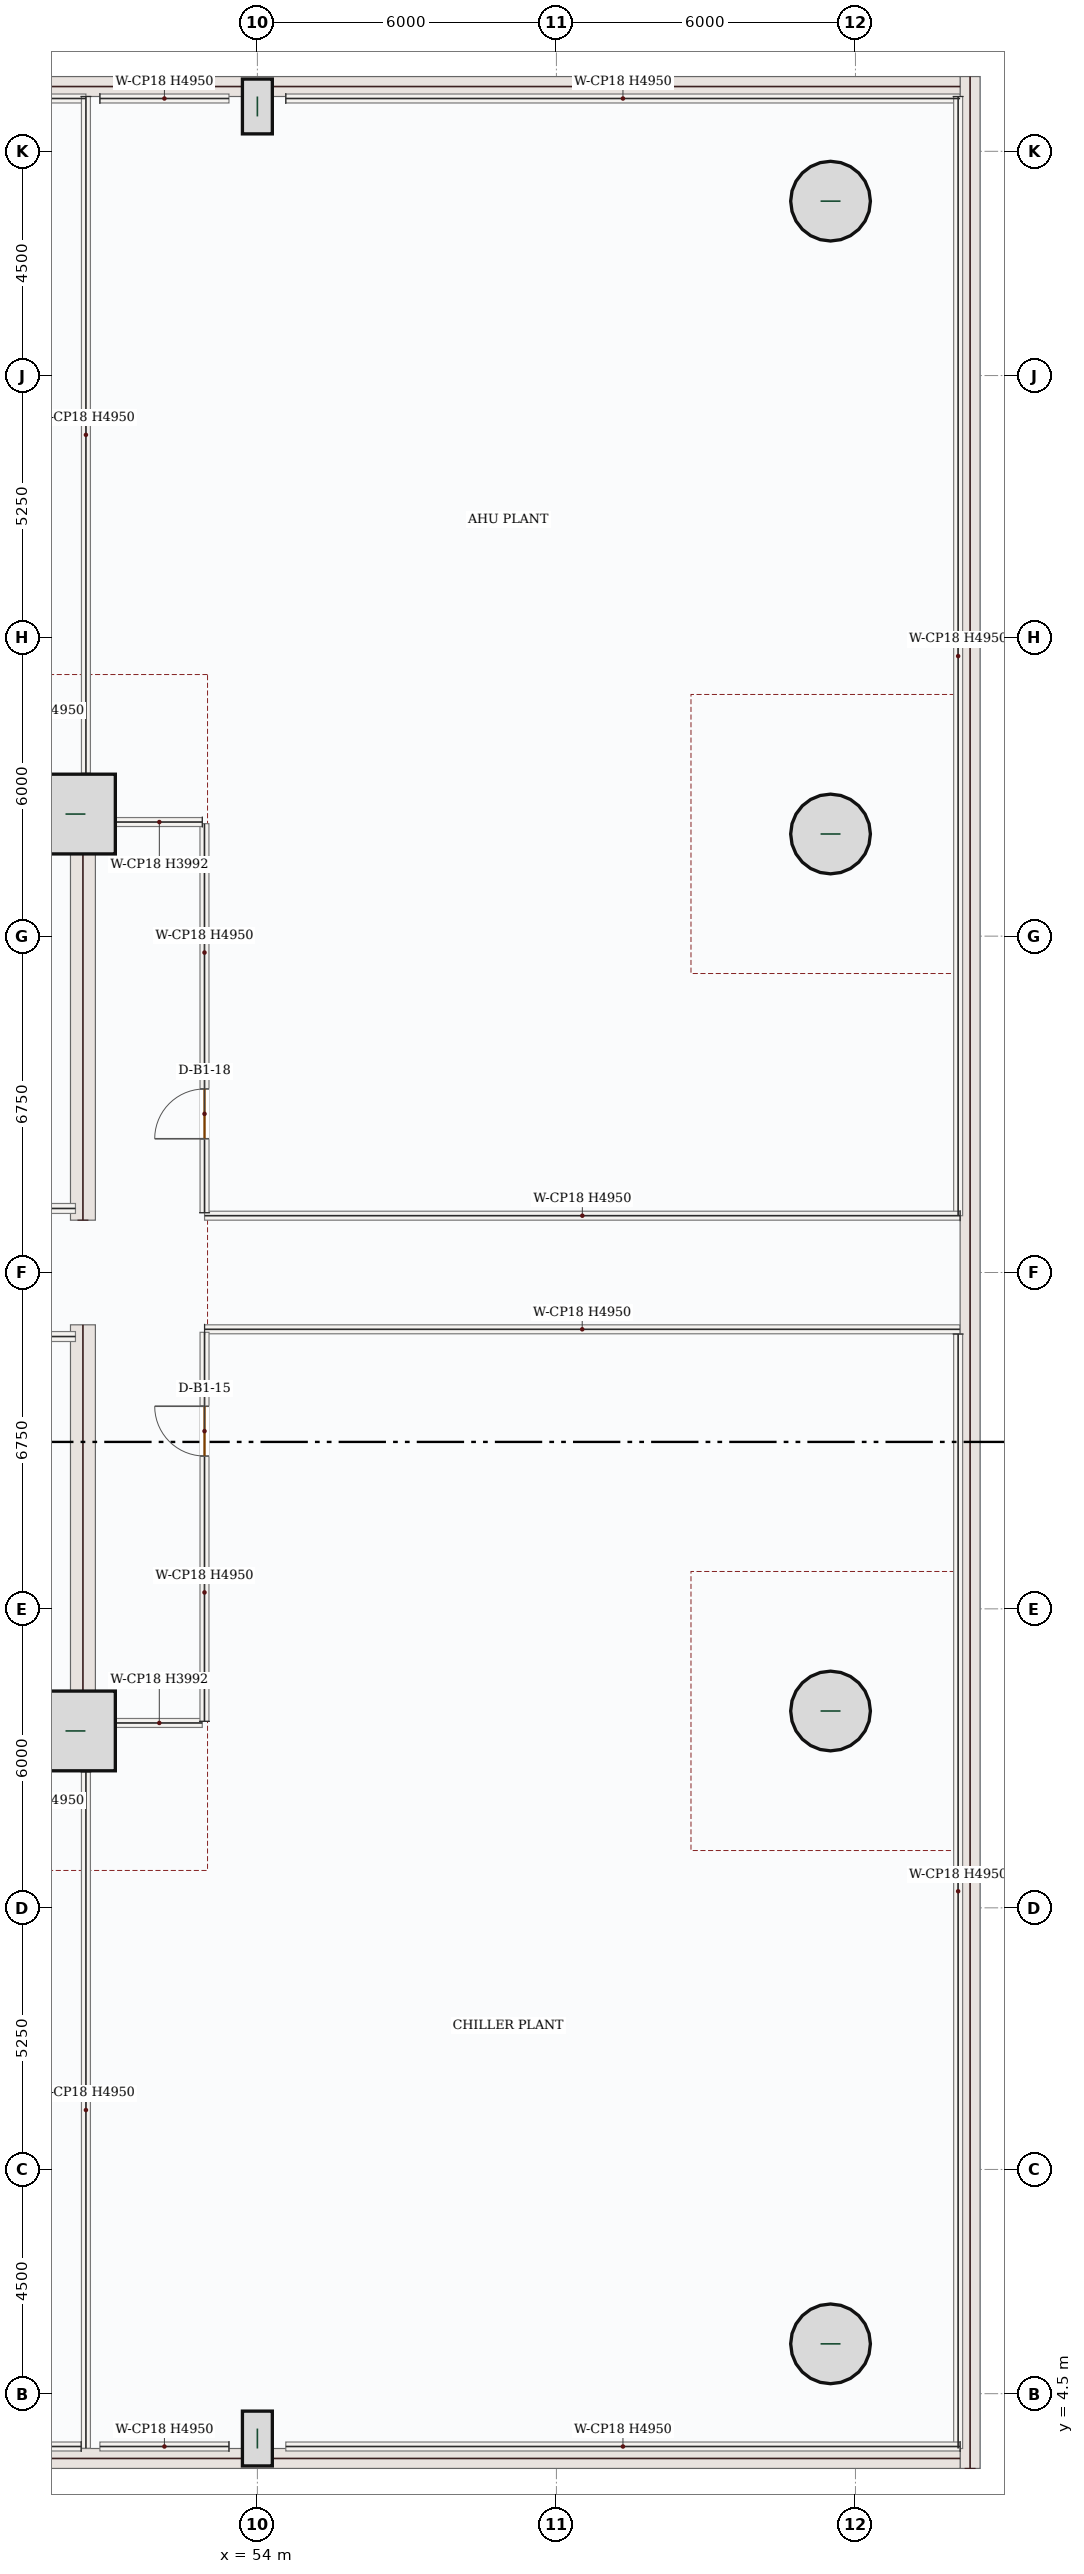
"""IFC4 building model, lengths in metres.
Left out: names, types, materials, properties, quantities, classifications, styles, units other than length and angle.
Written with IfcOpenShell. Run it as: python <this file> out.ifc"""

import sys

from ifc_helpers import new_model, si_unit, direction, frame, frame_2d, origin, origin_2d, place, context, subcontext, project, spatial, rectangle, hollow_circle, extrude, source, transform, mapped, element, fill, save


model = new_model("IFC4")
c1 = context("Model", 3, precision=1e-05, world=origin(), true_north=direction((0.0, 1.0)))
c2 = subcontext(c1, "Body", "Model", "MODEL_VIEW")
j1 = project(units=[si_unit("LENGTHUNIT", "METRE"), si_unit("PLANEANGLEUNIT", "RADIAN")], contexts=[c1])
p1 = place(None, origin())
s1 = spatial("IfcSite", under=j1, at=p1, CompositionType="ELEMENT")
p2 = place(p1, origin())
s2 = spatial("IfcBuilding", under=s1, at=p2, CompositionType="ELEMENT")
p3 = place(p2, frame((0.0, 0.0, -5.4)))
s3 = spatial("IfcBuildingStorey", under=s2, at=p3, CompositionType="ELEMENT", Elevation=-5.4)
m1 = source(origin(), c2, "Body", "SweptSolid", [
    extrude(rectangle(XDim=48.0, YDim=0.4, at=frame_2d((24.0, 0.0))), origin(), (0.0, 0.0, 1.0), 5.05),
])
p4 = place(p3, frame((68.3, 3.0, 0.0), z_axis=(0.0, 0.0, 1.0), x_axis=(0.0, 1.0, 0.0)))
e1 = element("IfcWall", 1, at=p4, inside=s3, PredefinedType="SHEAR", context=c2, shape_type="MappedRepresentation", body=[
    mapped(m1, transform((0.0, 0.0, 0.0), x_axis=(1.0, 0.0, 0.0), y_axis=(0.0, 1.0, 0.0), z_axis=(0.0, 0.0, 1.0), scale=1.0)),
])
m2 = source(origin(), c2, "Body", "SweptSolid", [
    extrude(rectangle(XDim=64.2, YDim=0.4, at=frame_2d((32.1, 0.0))), origin(), (0.0, 0.0, 1.0), 5.05),
])
for number, where, z_axis, x_axis in (
    (2, (3.9, 3.2, 0.0), (0.0, 0.0, 1.0), (1.0, 0.0, 0.0)),
    (3, (3.9, 50.8, 0.0), (0.0, 0.0, 1.0), (1.0, 0.0, 0.0)),
):
    element("IfcWall", number, at=place(p3, frame(where, z_axis=z_axis, x_axis=x_axis)), inside=s3, PredefinedType="SHEAR", context=c2, shape_type="MappedRepresentation", body=[
        mapped(m2, transform((0.0, 0.0, 0.0), x_axis=(1.0, 0.0, 0.0), y_axis=(0.0, 1.0, 0.0), z_axis=(0.0, 0.0, 1.0), scale=1.0)),
    ])
m3 = source(origin(), c2, "Body", "SweptSolid", [
    extrude(rectangle(XDim=8.55, YDim=0.5, at=frame_2d((4.275, 0.0))), origin(), (0.0, 0.0, 1.0), 4.95),
])
for number, where, z_axis, x_axis in (
    (4, (50.5, 17.4, 0.0), (0.0, 0.0, 1.0), (0.0, 1.0, 0.0)),
    (5, (50.5, 28.05, 0.0), (0.0, 0.0, 1.0), (0.0, 1.0, 0.0)),
):
    element("IfcWall", number, at=place(p3, frame(where, z_axis=z_axis, x_axis=x_axis)), inside=s3, PredefinedType="SHEAR", context=c2, shape_type="MappedRepresentation", body=[
        mapped(m3, transform((0.0, 0.0, 0.0), x_axis=(1.0, 0.0, 0.0), y_axis=(0.0, 1.0, 0.0), z_axis=(0.0, 0.0, 1.0), scale=1.0)),
    ])
m4 = source(origin(), c2, "Body", "SweptSolid", [
    extrude(rectangle(XDim=7.0, YDim=0.5, at=frame_2d((3.5, 0.0))), origin(), (0.0, 0.0, 1.0), 4.95),
])
for number, where, z_axis, x_axis in (
    (6, (43.25, 17.65, 0.0), (0.0, 0.0, 1.0), (1.0, 0.0, 0.0)),
    (7, (43.25, 36.35, 0.0), (0.0, 0.0, 1.0), (1.0, 0.0, 0.0)),
):
    element("IfcWall", number, at=place(p3, frame(where, z_axis=z_axis, x_axis=x_axis)), inside=s3, PredefinedType="SHEAR", context=c2, shape_type="MappedRepresentation", body=[
        mapped(m4, transform((0.0, 0.0, 0.0), x_axis=(1.0, 0.0, 0.0), y_axis=(0.0, 1.0, 0.0), z_axis=(0.0, 0.0, 1.0), scale=1.0)),
    ])
m5 = source(origin(), c2, "Body", "SweptSolid", [
    extrude(rectangle(XDim=1.6, YDim=1.6, at=origin_2d()), origin(), (0.0, 0.0, 1.0), 5.4),
])
for number, where, z_axis, x_axis in (
    (8, (50.35, 17.8, 0.0), (0.0, 0.0, 1.0), (1.0, 0.0, 0.0)),
    (9, (50.35, 36.2, 0.0), (0.0, 0.0, 1.0), (1.0, 0.0, 0.0)),
):
    element("IfcColumn", number, at=place(p3, frame(where, z_axis=z_axis, x_axis=x_axis)), inside=s3, PredefinedType="COLUMN", context=c2, shape_type="MappedRepresentation", body=[
        mapped(m5, transform((0.0, 0.0, 0.0), x_axis=(1.0, 0.0, 0.0), y_axis=(0.0, 1.0, 0.0), z_axis=(0.0, 0.0, 1.0), scale=1.0)),
    ])
m6 = source(origin(), c2, "Body", "SweptSolid", [
    extrude(hollow_circle(Radius=0.8, WallThickness=0.06, at=origin_2d()), origin(), (0.0, 0.0, 1.0), 5.4),
])
for number, where, z_axis, x_axis in (
    (10, (65.5, 5.5, 0.0), (0.0, 0.0, 1.0), (1.0, 0.0, 0.0)),
    (11, (65.5, 18.2, 0.0), (0.0, 0.0, 1.0), (1.0, 0.0, 0.0)),
    (12, (65.5, 35.8, 0.0), (0.0, 0.0, 1.0), (1.0, 0.0, 0.0)),
    (13, (65.5, 48.5, 0.0), (0.0, 0.0, 1.0), (1.0, 0.0, 0.0)),
):
    element("IfcColumn", number, at=place(p3, frame(where, z_axis=z_axis, x_axis=x_axis)), inside=s3, PredefinedType="COLUMN", context=c2, shape_type="MappedRepresentation", body=[
        mapped(m6, transform((0.0, 0.0, 0.0), x_axis=(1.0, 0.0, 0.0), y_axis=(0.0, 1.0, 0.0), z_axis=(0.0, 0.0, 1.0), scale=1.0)),
    ])
m7 = source(origin(), c2, "Body", "SweptSolid", [
    extrude(rectangle(XDim=0.6, YDim=1.1, at=origin_2d()), origin(), (0.0, 0.0, 1.0), 5.4),
])
for number, where, z_axis, x_axis in (
    (14, (54.0, 3.6, 0.0), (0.0, 0.0, 1.0), (1.0, 0.0, 0.0)),
    (15, (54.0, 50.4, 0.0), (0.0, 0.0, 1.0), (1.0, 0.0, 0.0)),
):
    element("IfcColumn", number, at=place(p3, frame(where, z_axis=z_axis, x_axis=x_axis)), inside=s3, PredefinedType="PILASTER", context=c2, shape_type="MappedRepresentation", body=[
        mapped(m7, transform((0.0, 0.0, 0.0), x_axis=(1.0, 0.0, 0.0), y_axis=(0.0, 1.0, 0.0), z_axis=(0.0, 0.0, 1.0), scale=1.0)),
    ])
m8 = source(origin(), c2, "Body", "SweptSolid", [
    extrude(rectangle(XDim=4.25, YDim=0.2, at=frame_2d((2.125, 0.0))), origin(), (0.0, 0.0, 1.0), 4.95),
])
for number, where, z_axis, x_axis in (
    (16, (46.1, 25.715, 0.0), (0.0, 0.0, 1.0), (1.0, 0.0, 0.0)),
    (17, (46.1, 28.285, 0.0), (0.0, 0.0, 1.0), (1.0, 0.0, 0.0)),
):
    element("IfcWall", number, at=place(p3, frame(where, z_axis=z_axis, x_axis=x_axis)), inside=s3, PredefinedType="SOLIDWALL", context=c2, shape_type="MappedRepresentation", body=[
        mapped(m8, transform((0.0, 0.0, 0.0), x_axis=(1.0, 0.0, 0.0), y_axis=(0.0, 1.0, 0.0), z_axis=(0.0, 0.0, 1.0), scale=1.0)),
    ])
m9 = source(origin(), c2, "Body", "SweptSolid", [
    extrude(rectangle(XDim=13.575, YDim=0.18, at=frame_2d((6.788, 0.0))), origin(), (0.0, 0.0, 1.0), 4.95),
])
p5 = place(p3, frame((50.56, 16.98, 0.0), z_axis=(0.0, 0.0, 1.0), x_axis=(0.0, -1.0, 0.0)))
e18 = element("IfcWall", 18, at=p5, inside=s3, PredefinedType="PARTITIONING", context=c2, shape_type="MappedRepresentation", body=[
    mapped(m9, transform((0.0, 0.0, 0.0), x_axis=(1.0, 0.0, 0.0), y_axis=(0.0, 1.0, 0.0), z_axis=(0.0, 0.0, 1.0), scale=1.0)),
])
m10 = source(origin(), c2, "Body", "SweptSolid", [
    extrude(rectangle(XDim=14.325, YDim=0.18, at=frame_2d((7.163, 0.0))), origin(), (0.0, 0.0, 1.0), 4.95),
])
p6 = place(p3, frame((50.465, 3.44, 0.0), z_axis=(0.0, 0.0, 1.0), x_axis=(-1.0, 0.0, 0.0)))
e19 = element("IfcWall", 19, at=p6, inside=s3, PredefinedType="PARTITIONING", context=c2, shape_type="MappedRepresentation", body=[
    mapped(m10, transform((0.0, 0.0, 0.0), x_axis=(1.0, 0.0, 0.0), y_axis=(0.0, 1.0, 0.0), z_axis=(0.0, 0.0, 1.0), scale=1.0)),
])
m11 = source(origin(), c2, "Body", "SweptSolid", [
    extrude(rectangle(XDim=29.12, YDim=0.18, at=frame_2d((14.56, 0.0))), origin(), (0.0, 0.0, 1.0), 4.95),
])
p7 = place(p3, frame((21.44, 50.56, 0.0), z_axis=(0.0, 0.0, 1.0), x_axis=(1.0, 0.0, 0.0)))
e20 = element("IfcWall", 20, at=p7, inside=s3, PredefinedType="PARTITIONING", context=c2, shape_type="MappedRepresentation", body=[
    mapped(m11, transform((0.0, 0.0, 0.0), x_axis=(1.0, 0.0, 0.0), y_axis=(0.0, 1.0, 0.0), z_axis=(0.0, 0.0, 1.0), scale=1.0)),
])
m12 = source(origin(), c2, "Body", "SweptSolid", [
    extrude(rectangle(XDim=13.58, YDim=0.18, at=frame_2d((6.79, 0.0))), origin(), (0.0, 0.0, 1.0), 4.95),
])
p8 = place(p3, frame((50.56, 50.6, 0.0), z_axis=(0.0, 0.0, 1.0), x_axis=(0.0, -1.0, 0.0)))
e21 = element("IfcWall", 21, at=p8, inside=s3, PredefinedType="PARTITIONING", context=c2, shape_type="MappedRepresentation", body=[
    mapped(m12, transform((0.0, 0.0, 0.0), x_axis=(1.0, 0.0, 0.0), y_axis=(0.0, 1.0, 0.0), z_axis=(0.0, 0.0, 1.0), scale=1.0)),
])
m13 = source(origin(), c2, "Body", "SweptSolid", [
    extrude(rectangle(XDim=15.155, YDim=0.18, at=frame_2d((7.578, 0.0))), origin(), (0.0, 0.0, 1.0), 4.95),
])
p9 = place(p3, frame((52.94, 25.86, 0.0), z_axis=(0.0, 0.0, 1.0), x_axis=(1.0, 0.0, 0.0)))
e22 = element("IfcWall", 22, at=p9, inside=s3, PredefinedType="PARTITIONING", context=c2, shape_type="MappedRepresentation", body=[
    mapped(m13, transform((0.0, 0.0, 0.0), x_axis=(1.0, 0.0, 0.0), y_axis=(0.0, 1.0, 0.0), z_axis=(0.0, 0.0, 1.0), scale=1.0)),
])
m14 = source(origin(), c2, "Body", "SweptSolid", [
    extrude(rectangle(XDim=22.365, YDim=0.18, at=frame_2d((11.183, 0.0))), origin(), (0.0, 0.0, 1.0), 4.95),
])
p10 = place(p3, frame((68.06, 25.765, 0.0), z_axis=(0.0, 0.0, 1.0), x_axis=(0.0, -1.0, 0.0)))
e23 = element("IfcWall", 23, at=p10, inside=s3, PredefinedType="PARTITIONING", context=c2, shape_type="MappedRepresentation", body=[
    mapped(m14, transform((0.0, 0.0, 0.0), x_axis=(1.0, 0.0, 0.0), y_axis=(0.0, 1.0, 0.0), z_axis=(0.0, 0.0, 1.0), scale=1.0)),
])
m15 = source(origin(), c2, "Body", "SweptSolid", [
    extrude(rectangle(XDim=13.53, YDim=0.18, at=frame_2d((6.765, 0.0))), origin(), (0.0, 0.0, 1.0), 4.95),
])
p11 = place(p3, frame((68.1, 3.44, 0.0), z_axis=(0.0, 0.0, 1.0), x_axis=(-1.0, 0.0, 0.0)))
e24 = element("IfcWall", 24, at=p11, inside=s3, PredefinedType="PARTITIONING", context=c2, shape_type="MappedRepresentation", body=[
    mapped(m15, transform((0.0, 0.0, 0.0), x_axis=(1.0, 0.0, 0.0), y_axis=(0.0, 1.0, 0.0), z_axis=(0.0, 0.0, 1.0), scale=1.0)),
])
m16 = source(origin(), c2, "Body", "SweptSolid", [
    extrude(rectangle(XDim=2.59, YDim=0.18, at=frame_2d((1.295, 0.0))), origin(), (0.0, 0.0, 1.0), 4.95),
])
p12 = place(p3, frame((53.43, 3.44, 0.0), z_axis=(0.0, 0.0, 1.0), x_axis=(-1.0, 0.0, 0.0)))
e25 = element("IfcWall", 25, at=p12, inside=s3, PredefinedType="PARTITIONING", context=c2, shape_type="MappedRepresentation", body=[
    mapped(m16, transform((0.0, 0.0, 0.0), x_axis=(1.0, 0.0, 0.0), y_axis=(0.0, 1.0, 0.0), z_axis=(0.0, 0.0, 1.0), scale=1.0)),
])
m17 = source(origin(), c2, "Body", "SweptSolid", [
    extrude(rectangle(XDim=1.724, YDim=0.18, at=frame_2d((0.862, 0.0))), origin(), (0.0, 0.0, 1.0), 3.992),
])
p13 = place(p3, frame((51.17, 17.96, 0.0), z_axis=(0.0, 0.0, 1.0), x_axis=(1.0, 0.0, 0.0)))
e26 = element("IfcWall", 26, at=p13, inside=s3, PredefinedType="PARTITIONING", context=c2, shape_type="MappedRepresentation", body=[
    mapped(m17, transform((0.0, 0.0, 0.0), x_axis=(1.0, 0.0, 0.0), y_axis=(0.0, 1.0, 0.0), z_axis=(0.0, 0.0, 1.0), scale=1.0)),
])
p14 = place(p3, frame((52.938, 17.992, 0.0), z_axis=(0.0, 0.0, 1.0), x_axis=(0.00025015634, 0.999999968711, 0.0)))
e27 = element("IfcWall", 27, at=p14, inside=s3, PredefinedType="PARTITIONING", context=c2, shape_type="SweptSolid", body=[
    extrude(rectangle(XDim=7.808, YDim=0.18, at=frame_2d((3.904, 0.0))), origin(), (0.0, 0.0, 1.0), 4.95),
])
p15 = place(p14, frame((5.324, 0.0, 0.0)))
e28 = element("IfcOpeningElement", 28, at=p15, cuts=e27, PredefinedType="OPENING", context=c2, shape_type="SweptSolid", body=[
    extrude(rectangle(XDim=1.0, YDim=2.15, at=frame_2d((0.5, 1.075))), frame((0.0, 0.1, 0.0), z_axis=(0.0, -1.0, 0.0), x_axis=(1.0, 0.0, 0.0)), (0.0, 0.0, 1.0), 0.2),
])
p16 = place(p3, frame((50.84, 50.56, 0.0), z_axis=(0.0, 0.0, 1.0), x_axis=(1.0, 0.0, 0.0)))
e29 = element("IfcWall", 29, at=p16, inside=s3, PredefinedType="PARTITIONING", context=c2, shape_type="MappedRepresentation", body=[
    mapped(m16, transform((0.0, 0.0, 0.0), x_axis=(1.0, 0.0, 0.0), y_axis=(0.0, 1.0, 0.0), z_axis=(0.0, 0.0, 1.0), scale=1.0)),
])
p17 = place(p3, frame((54.57, 50.56, 0.0), z_axis=(0.0, 0.0, 1.0), x_axis=(1.0, 0.0, 0.0)))
e30 = element("IfcWall", 30, at=p17, inside=s3, PredefinedType="PARTITIONING", context=c2, shape_type="MappedRepresentation", body=[
    mapped(m15, transform((0.0, 0.0, 0.0), x_axis=(1.0, 0.0, 0.0), y_axis=(0.0, 1.0, 0.0), z_axis=(0.0, 0.0, 1.0), scale=1.0)),
])
m18 = source(origin(), c2, "Body", "SweptSolid", [
    extrude(rectangle(XDim=22.46, YDim=0.18, at=frame_2d((11.23, 0.0))), origin(), (0.0, 0.0, 1.0), 4.95),
])
p18 = place(p3, frame((68.06, 50.6, 0.0), z_axis=(0.0, 0.0, 1.0), x_axis=(0.0, -1.0, 0.0)))
e31 = element("IfcWall", 31, at=p18, inside=s3, PredefinedType="PARTITIONING", context=c2, shape_type="MappedRepresentation", body=[
    mapped(m18, transform((0.0, 0.0, 0.0), x_axis=(1.0, 0.0, 0.0), y_axis=(0.0, 1.0, 0.0), z_axis=(0.0, 0.0, 1.0), scale=1.0)),
])
m19 = source(origin(), c2, "Body", "SweptSolid", [
    extrude(rectangle(XDim=15.16, YDim=0.18, at=frame_2d((7.58, 0.0))), origin(), (0.0, 0.0, 1.0), 4.95),
])
p19 = place(p3, frame((68.1, 28.14, 0.0), z_axis=(0.0, 0.0, 1.0), x_axis=(-1.0, 0.0, 0.0)))
e32 = element("IfcWall", 32, at=p19, inside=s3, PredefinedType="PARTITIONING", context=c2, shape_type="MappedRepresentation", body=[
    mapped(m19, transform((0.0, 0.0, 0.0), x_axis=(1.0, 0.0, 0.0), y_axis=(0.0, 1.0, 0.0), z_axis=(0.0, 0.0, 1.0), scale=1.0)),
])
p20 = place(p3, frame((52.94, 28.2, 0.0), z_axis=(0.0, 0.0, 1.0), x_axis=(-0.00025015634, 0.999999968711, 0.0)))
e33 = element("IfcWall", 33, at=p20, inside=s3, PredefinedType="PARTITIONING", context=c2, shape_type="SweptSolid", body=[
    extrude(rectangle(XDim=7.808, YDim=0.18, at=frame_2d((3.904, 0.0))), origin(), (0.0, 0.0, 1.0), 4.95),
])
p21 = place(p20, frame((1.484, 0.0, 0.0)))
e34 = element("IfcOpeningElement", 34, at=p21, cuts=e33, PredefinedType="OPENING", context=c2, shape_type="SweptSolid", body=[
    extrude(rectangle(XDim=1.0, YDim=2.15, at=frame_2d((0.5, 1.075))), frame((0.0, 0.1, 0.0), z_axis=(0.0, -1.0, 0.0), x_axis=(1.0, 0.0, 0.0)), (0.0, 0.0, 1.0), 0.2),
])
m20 = source(origin(), c2, "Body", "SweptSolid", [
    extrude(rectangle(XDim=1.726, YDim=0.18, at=frame_2d((0.863, 0.0))), origin(), (0.0, 0.0, 1.0), 3.992),
])
p22 = place(p3, frame((52.896, 36.04, 0.0), z_axis=(0.0, 0.0, 1.0), x_axis=(-1.0, 0.0, 0.0)))
e35 = element("IfcWall", 35, at=p22, inside=s3, PredefinedType="PARTITIONING", context=c2, shape_type="MappedRepresentation", body=[
    mapped(m20, transform((0.0, 0.0, 0.0), x_axis=(1.0, 0.0, 0.0), y_axis=(0.0, 1.0, 0.0), z_axis=(0.0, 0.0, 1.0), scale=1.0)),
])
m21 = source(origin(), c2, "Body", "SweptSolid", [
    extrude(rectangle(XDim=1.0, YDim=2.15, at=frame_2d((0.5, 1.075))), frame((0.0, 0.025, 0.0), z_axis=(0.0, -1.0, 0.0), x_axis=(1.0, 0.0, 0.0)), (0.0, 0.0, 1.0), 0.05),
])
p23 = place(p15, origin())
e36 = element("IfcDoor", 36, at=p23, inside=s3, OperationType="SINGLE_SWING_RIGHT", PredefinedType="DOOR", context=c2, shape_type="MappedRepresentation", body=[
    mapped(m21, transform((0.0, 0.0, 0.0), x_axis=(1.0, 0.0, 0.0), y_axis=(0.0, 1.0, 0.0), z_axis=(0.0, 0.0, 1.0), scale=1.0)),
])
fill(e28, e36)
p24 = place(p21, origin())
e37 = element("IfcDoor", 37, at=p24, inside=s3, OperationType="SINGLE_SWING_LEFT", PredefinedType="DOOR", context=c2, shape_type="MappedRepresentation", body=[
    mapped(m21, transform((0.0, 0.0, 0.0), x_axis=(1.0, 0.0, 0.0), y_axis=(0.0, 1.0, 0.0), z_axis=(0.0, 0.0, 1.0), scale=1.0)),
])
fill(e34, e37)
save(model, sys.argv[1])
